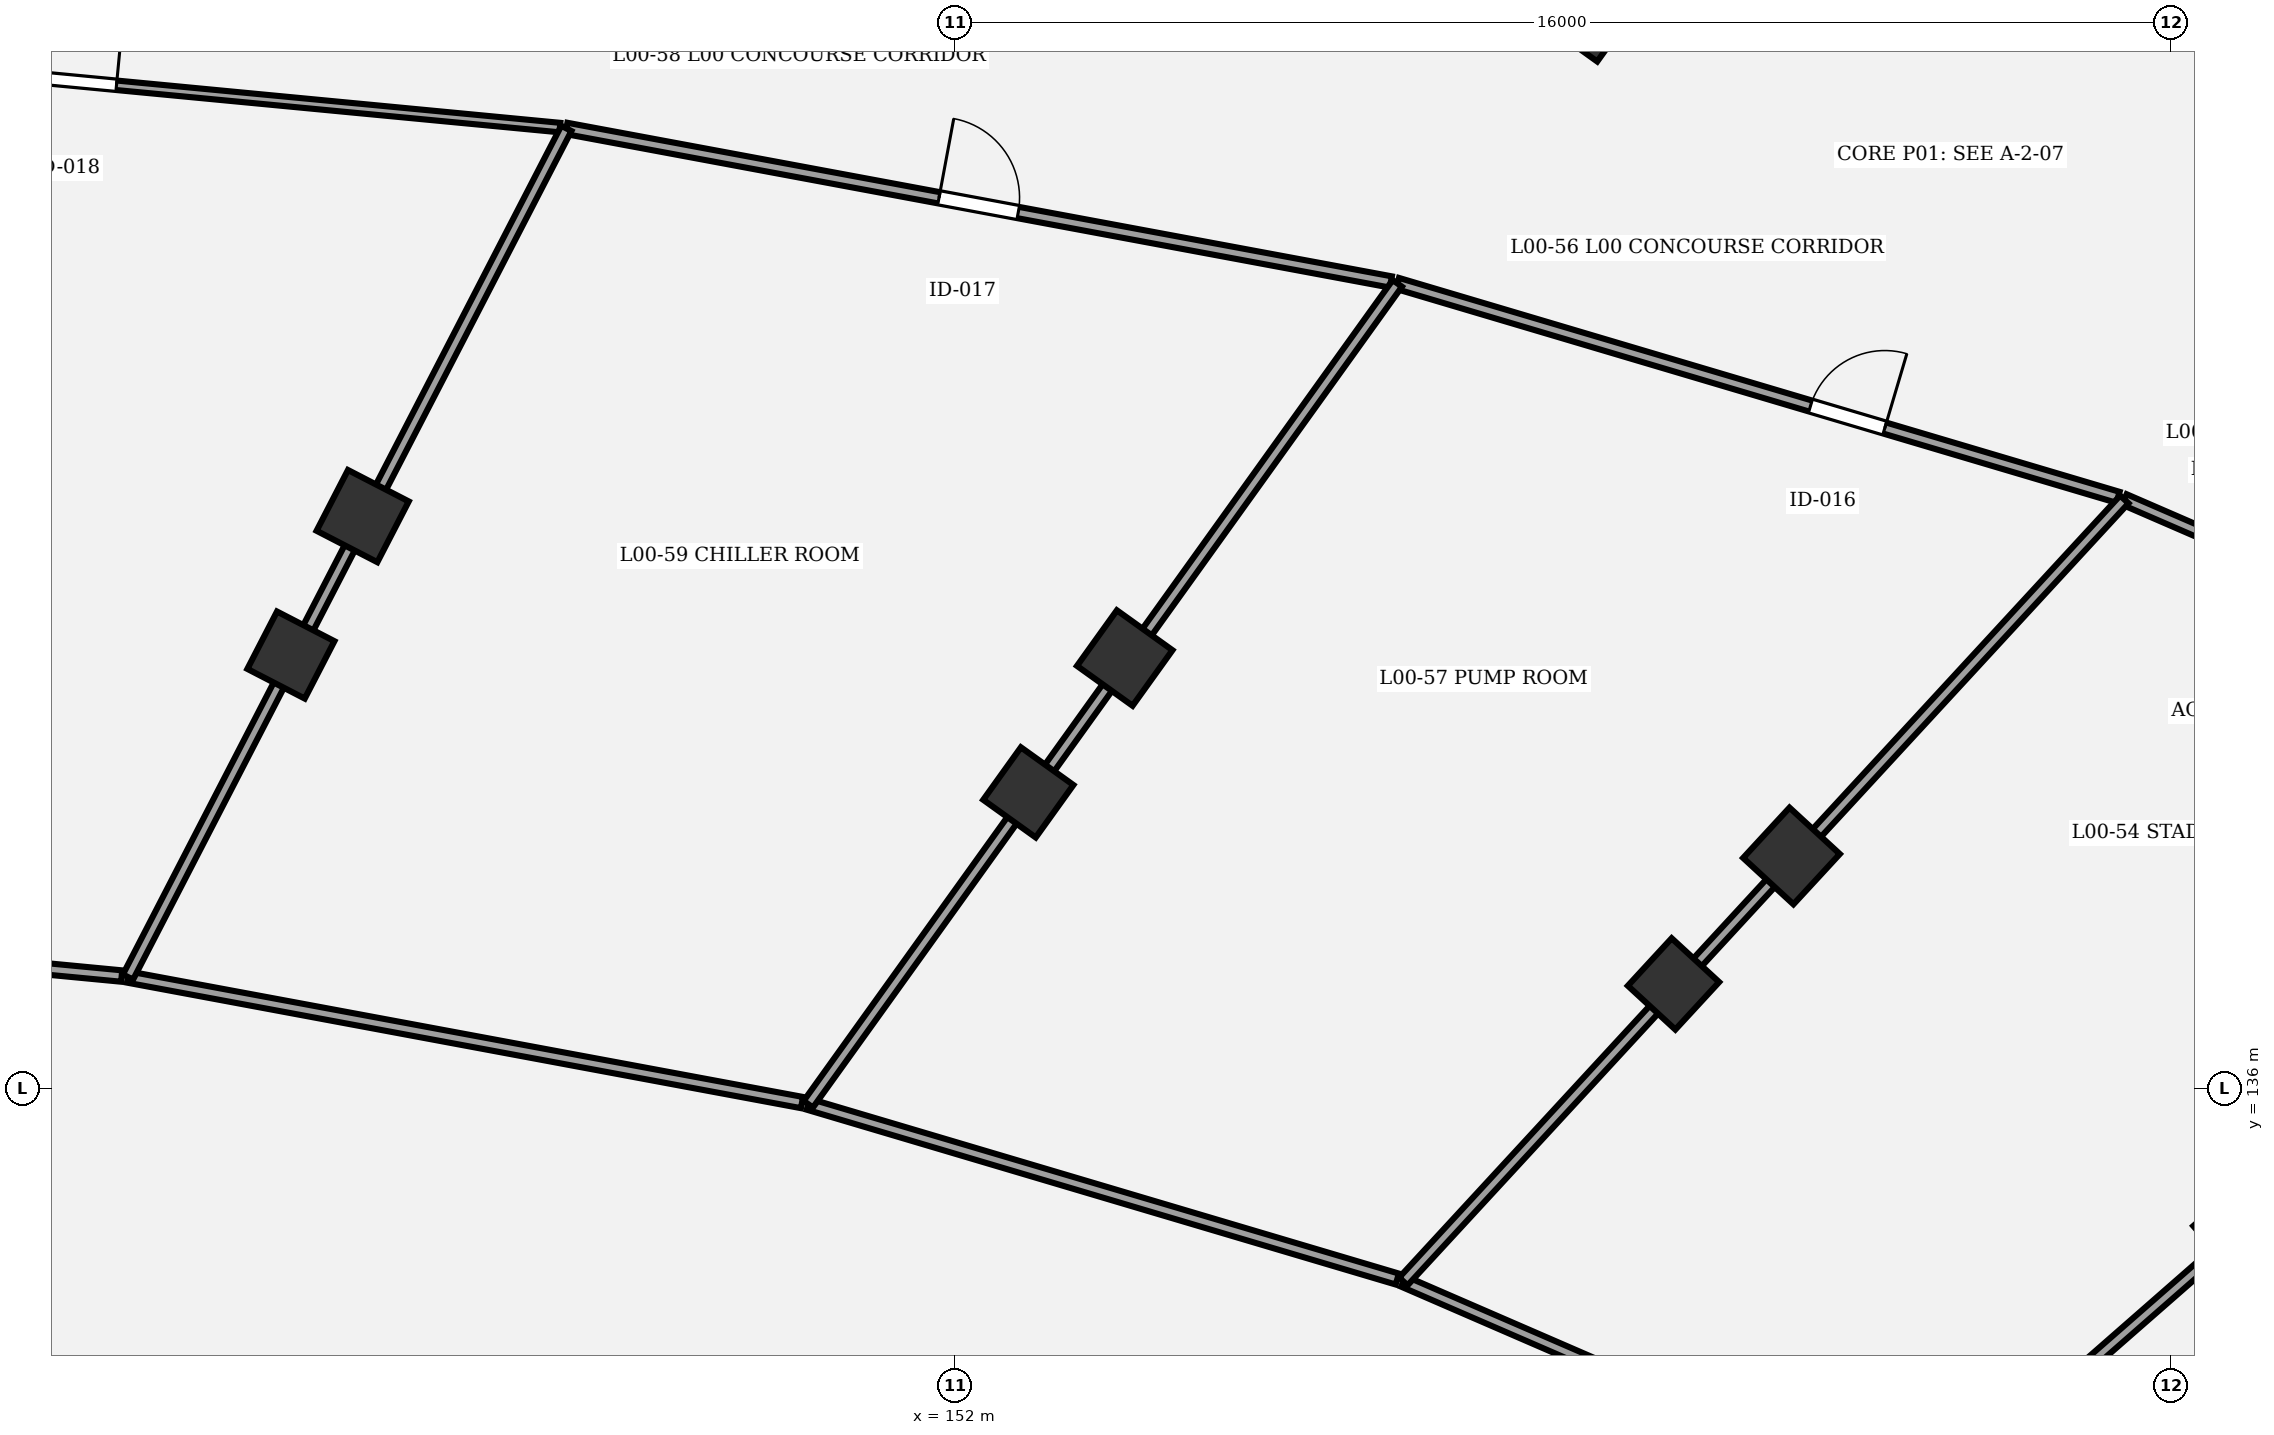
"""IFC4 building model, lengths in metres.
Left out: names, types, materials, properties, quantities, classifications, styles, units other than length and angle.
Written with IfcOpenShell. Run it as: python <this file> out.ifc"""

import sys

from ifc_helpers import new_model, si_unit, direction, frame, frame_2d, origin, origin_2d, place, context, subcontext, project, spatial, rectangle, extrude, element, fill, save


model = new_model("IFC4")
c1 = context("Model", 3, precision=1e-05, world=origin(), true_north=direction((0.0, 1.0)))
c2 = subcontext(c1, "Body", "Model", "MODEL_VIEW")
j1 = project(units=[si_unit("LENGTHUNIT", "METRE"), si_unit("PLANEANGLEUNIT", "RADIAN")], contexts=[c1])
p1 = place(None, origin())
s1 = spatial("IfcSite", under=j1, at=p1, CompositionType="ELEMENT")
p2 = place(p1, origin())
s2 = spatial("IfcBuilding", under=s1, at=p2, CompositionType="ELEMENT")
p3 = place(p2, origin())
s3 = spatial("IfcBuildingStorey", under=s2, at=p3, CompositionType="ELEMENT", Elevation=0.0)
for number, where, z_axis, x_axis in (
    (1, (168.889, 134.154, 0.0), (0.0, 0.0, 1.0), (0.753, 0.659, 0.0)),
    (2, (161.45, 137.379, 0.0), (0.0, 0.0, 1.0), (0.678, 0.735, 0.0)),
):
    element("IfcColumn", number, at=place(p3, frame(where, z_axis=z_axis, x_axis=x_axis)), inside=s3, PredefinedType="COLUMN", context=c2, shape_type="SweptSolid", body=[
        extrude(rectangle(XDim=0.85, YDim=0.85, at=origin_2d()), origin(), (0.0, 0.0, 1.0), 5.4),
    ])
p4 = place(p3, frame((163.003, 139.062, 0.0), z_axis=(0.0, 0.0, 1.0), x_axis=(0.677903094969, 0.735151272753, 0.0)))
e3 = element("IfcColumn", 3, at=p4, inside=s3, PredefinedType="COLUMN", context=c2, shape_type="SweptSolid", body=[
    extrude(rectangle(XDim=0.9, YDim=0.9, at=origin_2d()), origin(), (0.0, 0.0, 1.0), 5.4),
])
p5 = place(p3, frame((152.962, 139.899, 0.0), z_axis=(0.0, 0.0, 1.0), x_axis=(0.582974127943, 0.812490717577, 0.0)))
e4 = element("IfcColumn", 4, at=p5, inside=s3, PredefinedType="COLUMN", context=c2, shape_type="SweptSolid", body=[
    extrude(rectangle(XDim=0.85, YDim=0.85, at=origin_2d()), origin(), (0.0, 0.0, 1.0), 5.4),
])
p6 = place(p3, frame((154.23, 141.667, 0.0), z_axis=(0.0, 0.0, 1.0), x_axis=(0.582974127943, 0.812490717577, 0.0)))
e5 = element("IfcColumn", 5, at=p6, inside=s3, PredefinedType="COLUMN", context=c2, shape_type="SweptSolid", body=[
    extrude(rectangle(XDim=0.9, YDim=0.9, at=origin_2d()), origin(), (0.0, 0.0, 1.0), 5.4),
])
p7 = place(p3, frame((160.338, 150.177, 0.0), z_axis=(0.0, 0.0, 1.0), x_axis=(0.582974127943, 0.812490717577, 0.0)))
e6 = element("IfcColumn", 6, at=p7, inside=s3, PredefinedType="COLUMN", context=c2, shape_type="SweptSolid", body=[
    extrude(rectangle(XDim=0.95, YDim=0.95, at=origin_2d()), origin(), (0.0, 0.0, 1.0), 5.4),
])
p8 = place(p3, frame((143.259, 141.706, 0.0), z_axis=(0.0, 0.0, 1.0), x_axis=(0.458959712465, 0.888457079624, 0.0)))
e7 = element("IfcColumn", 7, at=p8, inside=s3, PredefinedType="COLUMN", context=c2, shape_type="SweptSolid", body=[
    extrude(rectangle(XDim=0.85, YDim=0.85, at=origin_2d()), origin(), (0.0, 0.0, 1.0), 5.4),
])
p9 = place(p3, frame((144.204, 143.534, 0.0), z_axis=(0.0, 0.0, 1.0), x_axis=(0.458959712465, 0.888457079624, 0.0)))
e8 = element("IfcColumn", 8, at=p9, inside=s3, PredefinedType="COLUMN", context=c2, shape_type="SweptSolid", body=[
    extrude(rectangle(XDim=0.9, YDim=0.9, at=origin_2d()), origin(), (0.0, 0.0, 1.0), 5.4),
])
p10 = place(p3, frame((163.663, 151.416, 0.0), z_axis=(0.0, 0.0, 1.0), x_axis=(0.958665631999, -0.284535069937, 0.0)))
e9 = element("IfcWall", 9, at=p10, inside=s3, PredefinedType="SHEAR", context=c2, shape_type="SweptSolid", body=[
    extrude(rectangle(XDim=8.54, YDim=0.22, at=frame_2d((4.27, 0.0))), origin(), (0.0, 0.0, 1.0), 5.15),
])
p11 = place(p10, frame((0.3, 0.0, 0.0)))
e10 = element("IfcOpeningElement", 10, at=p11, cuts=e9, PredefinedType="OPENING", context=c2, shape_type="SweptSolid", body=[
    extrude(rectangle(XDim=1.15, YDim=2.15, at=frame_2d((0.575, 1.075))), frame((0.0, 0.12, 0.0), z_axis=(0.0, -1.0, 0.0), x_axis=(1.0, 0.0, 0.0)), (0.0, 0.0, 1.0), 0.24),
])
p12 = place(p3, frame((167.382, 143.753, 0.0), z_axis=(0.0, 0.0, 1.0), x_axis=(0.917494590455, -0.397748257677, 0.0)))
e11 = element("IfcWall", 11, at=p12, inside=s3, PredefinedType="PARTITIONING", context=c2, shape_type="SweptSolid", body=[
    extrude(rectangle(XDim=9.049, YDim=0.15, at=frame_2d((4.525, 0.0))), origin(), (0.0, 0.0, 1.0), 4.15),
])
p13 = place(p12, frame((6.295, 0.0, 0.0)))
e12 = element("IfcOpeningElement", 12, at=p13, cuts=e11, PredefinedType="OPENING", context=c2, shape_type="SweptSolid", body=[
    extrude(rectangle(XDim=0.94, YDim=2.2, at=frame_2d((0.47, 1.1))), frame((0.0, 0.085, 0.0), z_axis=(0.0, -1.0, 0.0), x_axis=(1.0, 0.0, 0.0)), (0.0, 0.0, 1.0), 0.17),
])
p14 = place(p3, frame((157.817, 146.596, 0.0), z_axis=(0.0, 0.0, 1.0), x_axis=(0.958655809656, -0.284568161629, 0.0)))
e13 = element("IfcWall", 13, at=p14, inside=s3, PredefinedType="PARTITIONING", context=c2, shape_type="SweptSolid", body=[
    extrude(rectangle(XDim=9.891, YDim=0.15, at=frame_2d((4.946, 0.0))), origin(), (0.0, 0.0, 1.0), 4.15),
])
p15 = place(p14, frame((5.67, 0.0, 0.0)))
e14 = element("IfcOpeningElement", 14, at=p15, cuts=e13, PredefinedType="OPENING", context=c2, shape_type="SweptSolid", body=[
    extrude(rectangle(XDim=1.02, YDim=2.2, at=frame_2d((0.51, 1.1))), frame((0.0, 0.085, 0.0), z_axis=(0.0, -1.0, 0.0), x_axis=(1.0, 0.0, 0.0)), (0.0, 0.0, 1.0), 0.17),
])
p16 = place(p3, frame((146.884, 148.635, 0.0), z_axis=(0.0, 0.0, 1.0), x_axis=(0.983097372707, -0.183083466695, 0.0)))
e15 = element("IfcWall", 15, at=p16, inside=s3, PredefinedType="PARTITIONING", context=c2, shape_type="SweptSolid", body=[
    extrude(rectangle(XDim=11.035, YDim=0.15, at=frame_2d((5.517, 0.0))), origin(), (0.0, 0.0, 1.0), 4.15),
])
p17 = place(p16, frame((4.987, 0.0, 0.0)))
e16 = element("IfcOpeningElement", 16, at=p17, cuts=e15, PredefinedType="OPENING", context=c2, shape_type="SweptSolid", body=[
    extrude(rectangle(XDim=1.06, YDim=2.2, at=frame_2d((0.53, 1.1))), frame((0.0, 0.085, 0.0), z_axis=(0.0, -1.0, 0.0), x_axis=(1.0, 0.0, 0.0)), (0.0, 0.0, 1.0), 0.17),
])
p18 = place(p3, frame((134.035, 149.862, 0.0), z_axis=(0.0, 0.0, 1.0), x_axis=(0.995485111947, -0.094917816515, 0.0)))
e17 = element("IfcWall", 17, at=p18, inside=s3, PredefinedType="PARTITIONING", context=c2, shape_type="SweptSolid", body=[
    extrude(rectangle(XDim=12.822, YDim=0.125, at=frame_2d((6.411, 0.0))), origin(), (0.0, 0.0, 1.0), 4.15),
])
p19 = place(p18, frame((5.861, 0.0, 0.0)))
e18 = element("IfcOpeningElement", 18, at=p19, cuts=e17, PredefinedType="OPENING", context=c2, shape_type="SweptSolid", body=[
    extrude(rectangle(XDim=1.1, YDim=2.2, at=frame_2d((0.55, 1.1))), frame((0.0, 0.073, 0.0), z_axis=(0.0, -1.0, 0.0), x_axis=(1.0, 0.0, 0.0)), (0.0, 0.0, 1.0), 0.145),
])
p20 = place(p3, frame((164.755, 130.483, 0.0), z_axis=(0.0, 0.0, 1.0), x_axis=(0.75255911769, 0.658524695346, 0.0)))
e19 = element("IfcWall", 19, at=p20, inside=s3, PredefinedType="PARTITIONING", context=c2, shape_type="SweptSolid", body=[
    extrude(rectangle(XDim=14.627, YDim=0.15, at=frame_2d((7.314, 0.0))), origin(), (0.0, 0.0, 1.0), 4.15),
])
p21 = place(p3, frame((164.68, 130.524, 0.0), z_axis=(0.0, 0.0, 1.0), x_axis=(-0.917502611666, 0.397729754463, 0.0)))
e20 = element("IfcWall", 20, at=p21, inside=s3, PredefinedType="PARTITIONING", context=c2, shape_type="SweptSolid", body=[
    extrude(rectangle(XDim=7.394, YDim=0.15, at=frame_2d((3.697, 0.0))), origin(), (0.0, 0.0, 1.0), 4.15),
])
p22 = place(p3, frame((157.896, 133.465, 0.0), z_axis=(0.0, 0.0, 1.0), x_axis=(0.677851738249, 0.735198626871, 0.0)))
e21 = element("IfcWall", 21, at=p22, inside=s3, PredefinedType="PARTITIONING", context=c2, shape_type="SweptSolid", body=[
    extrude(rectangle(XDim=13.994, YDim=0.15, at=frame_2d((6.997, 0.0))), origin(), (0.0, 0.0, 1.0), 4.15),
])
p23 = place(p3, frame((157.816, 133.496, 0.0), z_axis=(0.0, 0.0, 1.0), x_axis=(-0.958664246127, 0.284539739226, 0.0)))
e22 = element("IfcWall", 22, at=p23, inside=s3, PredefinedType="PARTITIONING", context=c2, shape_type="SweptSolid", body=[
    extrude(rectangle(XDim=8.083, YDim=0.15, at=frame_2d((4.042, 0.0))), origin(), (0.0, 0.0, 1.0), 4.15),
])
p24 = place(p3, frame((150.067, 135.796, 0.0), z_axis=(0.0, 0.0, 1.0), x_axis=(0.583015953896, 0.812460705205, 0.0)))
e23 = element("IfcWall", 23, at=p24, inside=s3, PredefinedType="PARTITIONING", context=c2, shape_type="SweptSolid", body=[
    extrude(rectangle(XDim=13.292, YDim=0.15, at=frame_2d((6.646, 0.0))), origin(), (0.0, 0.0, 1.0), 4.15),
])
p25 = place(p3, frame((149.984, 135.818, 0.0), z_axis=(0.0, 0.0, 1.0), x_axis=(-0.983094830755, 0.183097115603, 0.0)))
e24 = element("IfcWall", 24, at=p25, inside=s3, PredefinedType="PARTITIONING", context=c2, shape_type="SweptSolid", body=[
    extrude(rectangle(XDim=9.021, YDim=0.15, at=frame_2d((4.51, 0.0))), origin(), (0.0, 0.0, 1.0), 4.15),
])
p26 = place(p3, frame((141.116, 137.47, 0.0), z_axis=(0.0, 0.0, 1.0), x_axis=(0.45894823356, 0.88846300931, 0.0)))
e25 = element("IfcWall", 25, at=p26, inside=s3, PredefinedType="PARTITIONING", context=c2, shape_type="SweptSolid", body=[
    extrude(rectangle(XDim=12.566, YDim=0.15, at=frame_2d((6.283, 0.0))), origin(), (0.0, 0.0, 1.0), 4.15),
])
p27 = place(p3, frame((141.033, 137.483, 0.0), z_axis=(0.0, 0.0, 1.0), x_axis=(-0.99548363917, 0.094933261529, 0.0)))
e26 = element("IfcWall", 26, at=p27, inside=s3, PredefinedType="PARTITIONING", context=c2, shape_type="SweptSolid", body=[
    extrude(rectangle(XDim=10.485, YDim=0.15, at=frame_2d((5.242, 0.0))), origin(), (0.0, 0.0, 1.0), 4.15),
])
p28 = place(p15, origin())
e27 = element("IfcDoor", 27, at=p28, inside=s3, OperationType="SINGLE_SWING_RIGHT", PredefinedType="DOOR", context=c2, shape_type="SweptSolid", body=[
    extrude(rectangle(XDim=1.02, YDim=2.2, at=frame_2d((0.51, 1.1))), frame((0.0, 0.025, 0.0), z_axis=(0.0, -1.0, 0.0), x_axis=(1.0, 0.0, 0.0)), (0.0, 0.0, 1.0), 0.05),
])
fill(e14, e27)
p29 = place(p17, origin())
e28 = element("IfcDoor", 28, at=p29, inside=s3, OperationType="SINGLE_SWING_LEFT", PredefinedType="DOOR", context=c2, shape_type="SweptSolid", body=[
    extrude(rectangle(XDim=1.06, YDim=2.2, at=frame_2d((0.53, 1.1))), frame((0.0, 0.025, 0.0), z_axis=(0.0, -1.0, 0.0), x_axis=(1.0, 0.0, 0.0)), (0.0, 0.0, 1.0), 0.05),
])
fill(e16, e28)
p30 = place(p19, origin())
e29 = element("IfcDoor", 29, at=p30, inside=s3, OperationType="SINGLE_SWING_RIGHT", PredefinedType="DOOR", context=c2, shape_type="SweptSolid", body=[
    extrude(rectangle(XDim=1.1, YDim=2.2, at=frame_2d((0.55, 1.1))), frame((0.0, 0.025, 0.0), z_axis=(0.0, -1.0, 0.0), x_axis=(1.0, 0.0, 0.0)), (0.0, 0.0, 1.0), 0.05),
])
fill(e18, e29)
save(model, sys.argv[1])
